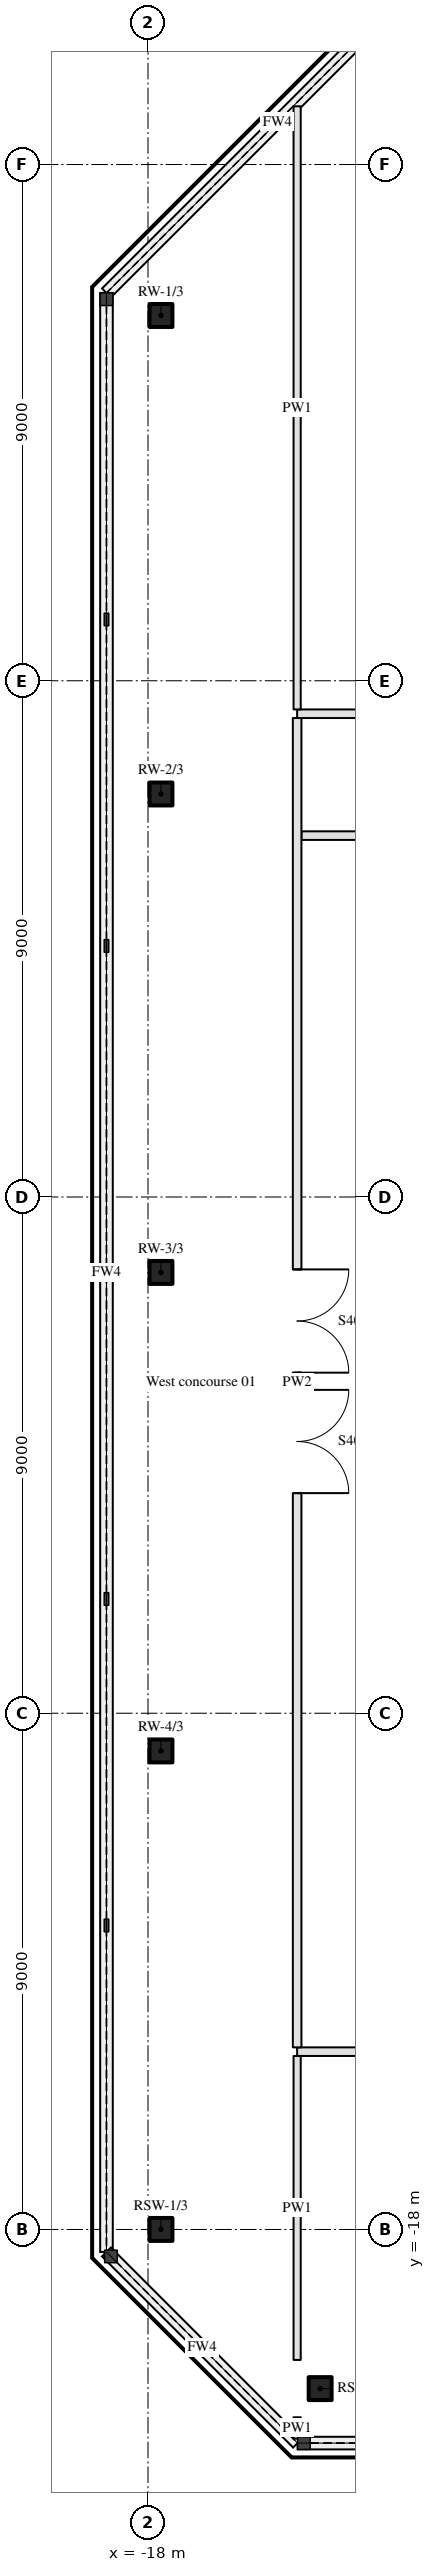
"""IFC4 building model, lengths in metres.
Left out: names, types, materials, properties, quantities, classifications, styles, units other than length and angle.
Written with IfcOpenShell. Run it as: python <this file> out.ifc"""

import sys

from ifc_helpers import new_model, si_unit, direction, frame, frame_2d, origin, origin_2d, place, context, subcontext, project, spatial, rectangle, hollow_rectangle, extrude, element, fill, save


model = new_model("IFC4")
c1 = context("Model", 3, precision=1e-05, world=origin(), true_north=direction((0.0, 1.0)))
c2 = subcontext(c1, "Body", "Model", "MODEL_VIEW")
j1 = project(units=[si_unit("LENGTHUNIT", "METRE"), si_unit("PLANEANGLEUNIT", "RADIAN")], contexts=[c1])
p1 = place(None, origin())
s1 = spatial("IfcSite", under=j1, at=p1, CompositionType="ELEMENT")
p2 = place(p1, origin())
s2 = spatial("IfcBuilding", under=s1, at=p2, CompositionType="ELEMENT")
p3 = place(p2, frame((0.0, 0.0, 162.3)))
s3 = spatial("IfcBuildingStorey", under=s2, at=p3, CompositionType="ELEMENT", Elevation=162.3)
for number, where, z_axis, x_axis in (
    (1, (-14.999, -20.774, 0.0), (0.0, 0.0, 1.0), (1.0, 0.0, 0.0)),
    (2, (-17.774, 15.368, 0.0), (0.0, 0.0, 1.0), (1.0, 0.0, 0.0)),
    (3, (-17.774, 7.026, 0.0), (0.0, 0.0, 1.0), (1.0, 0.0, 0.0)),
    (4, (-17.774, -1.315, 0.0), (0.0, 0.0, 1.0), (1.0, 0.0, 0.0)),
    (5, (-17.774, -9.657, 0.0), (0.0, 0.0, 1.0), (1.0, 0.0, 0.0)),
    (6, (-17.774, -17.999, 0.0), (0.0, 0.0, 1.0), (1.0, 0.0, 0.0)),
):
    element("IfcColumn", number, at=place(p3, frame(where, z_axis=z_axis, x_axis=x_axis)), inside=s3, PredefinedType="COLUMN", context=c2, shape_type="SweptSolid", body=[
        extrude(hollow_rectangle(XDim=0.4, YDim=0.4, WallThickness=0.02, InnerFilletRadius=0.03, OuterFilletRadius=0.05, at=origin_2d()), origin(), (0.0, 0.0, 1.0), 5.4),
    ])
p4 = place(p3, frame((-15.4, -14.9, 0.0), z_axis=(0.0, 0.0, 1.0), x_axis=(1.0, 0.0, 0.0)))
e7 = element("IfcWall", 7, at=p4, inside=s3, PredefinedType="PARTITIONING", context=c2, shape_type="SweptSolid", body=[
    extrude(rectangle(XDim=30.8, YDim=0.15, at=frame_2d((15.4, 0.0))), origin(), (0.0, 0.0, 1.0), 4.46),
])
p5 = place(p4, frame((14.5, 0.0, 0.0)))
e8 = element("IfcOpeningElement", 8, at=p5, cuts=e7, PredefinedType="OPENING", context=c2, shape_type="SweptSolid", body=[
    extrude(rectangle(XDim=1.8, YDim=2.1, at=frame_2d((0.9, 1.05))), frame((0.0, 0.085, 0.0), z_axis=(0.0, -1.0, 0.0), x_axis=(1.0, 0.0, 0.0)), (0.0, 0.0, 1.0), 0.17),
])
p6 = place(p4, frame((16.6, 0.0, 0.0)))
e9 = element("IfcOpeningElement", 9, at=p6, cuts=e7, PredefinedType="OPENING", context=c2, shape_type="SweptSolid", body=[
    extrude(rectangle(XDim=1.8, YDim=2.1, at=frame_2d((0.9, 1.05))), frame((0.0, 0.085, 0.0), z_axis=(0.0, -1.0, 0.0), x_axis=(1.0, 0.0, 0.0)), (0.0, 0.0, 1.0), 0.17),
])
p7 = place(p3, frame((-15.325, 6.3, 0.0), z_axis=(0.0, 0.0, 1.0), x_axis=(1.0, 0.0, 0.0)))
e10 = element("IfcWall", 10, at=p7, inside=s3, PredefinedType="PARTITIONING", context=c2, shape_type="SweptSolid", body=[
    extrude(rectangle(XDim=7.975, YDim=0.15, at=frame_2d((3.987, 0.0))), origin(), (0.0, 0.0, 1.0), 4.46),
])
p8 = place(p7, frame((1.55, 0.0, 0.0)))
e11 = element("IfcOpeningElement", 11, at=p8, cuts=e10, PredefinedType="OPENING", context=c2, shape_type="SweptSolid", body=[
    extrude(rectangle(XDim=0.9, YDim=2.1, at=frame_2d((0.45, 1.05))), frame((0.0, 0.085, 0.0), z_axis=(0.0, -1.0, 0.0), x_axis=(1.0, 0.0, 0.0)), (0.0, 0.0, 1.0), 0.17),
])
p9 = place(p7, frame((5.538, 0.0, 0.0)))
e12 = element("IfcOpeningElement", 12, at=p9, cuts=e10, PredefinedType="OPENING", context=c2, shape_type="SweptSolid", body=[
    extrude(rectangle(XDim=0.9, YDim=2.1, at=frame_2d((0.45, 1.05))), frame((0.0, 0.085, 0.0), z_axis=(0.0, -1.0, 0.0), x_axis=(1.0, 0.0, 0.0)), (0.0, 0.0, 1.0), 0.17),
])
p10 = place(p3, frame((-15.4, 8.425, 0.0), z_axis=(0.0, 0.0, 1.0), x_axis=(1.0, 0.0, 0.0)))
e13 = element("IfcWall", 13, at=p10, inside=s3, PredefinedType="PARTITIONING", context=c2, shape_type="SweptSolid", body=[
    extrude(rectangle(XDim=8.15, YDim=0.15, at=frame_2d((4.075, 0.0))), origin(), (0.0, 0.0, 1.0), 4.46),
])
p11 = place(p3, frame((-15.4, -21.646, 0.0), z_axis=(0.0, 0.0, 1.0), x_axis=(0.0, 1.0, 0.0)))
e14 = element("IfcWall", 14, at=p11, inside=s3, PredefinedType="PARTITIONING", context=c2, shape_type="SweptSolid", body=[
    extrude(rectangle(XDim=0.372, YDim=0.125, at=frame_2d((0.186, 0.0))), origin(), (0.0, 0.0, 1.0), 4.46),
])
p12 = place(p3, frame((-15.4, -20.274, 0.0), z_axis=(0.0, 0.0, 1.0), x_axis=(0.0, 1.0, 0.0)))
e15 = element("IfcWall", 15, at=p12, inside=s3, PredefinedType="PARTITIONING", context=c2, shape_type="SweptSolid", body=[
    extrude(rectangle(XDim=5.299, YDim=0.125, at=frame_2d((2.649, 0.0))), origin(), (0.0, 0.0, 1.0), 4.46),
])
p13 = place(p3, frame((-15.4, 8.35, 0.0), z_axis=(0.0, 0.0, 1.0), x_axis=(0.0, -1.0, 0.0)))
e16 = element("IfcWall", 16, at=p13, inside=s3, PredefinedType="PARTITIONING", context=c2, shape_type="SweptSolid", body=[
    extrude(rectangle(XDim=23.175, YDim=0.15, at=frame_2d((11.587, 0.0))), origin(), (0.0, 0.0, 1.0), 4.46),
])
p14 = place(p13, frame((11.712, 0.0, 0.0)))
e17 = element("IfcOpeningElement", 17, at=p14, cuts=e16, PredefinedType="OPENING", context=c2, shape_type="SweptSolid", body=[
    extrude(rectangle(XDim=1.8, YDim=2.1, at=frame_2d((0.9, 1.05))), frame((0.0, 0.085, 0.0), z_axis=(0.0, -1.0, 0.0), x_axis=(1.0, 0.0, 0.0)), (0.0, 0.0, 1.0), 0.17),
])
p15 = place(p13, frame((9.613, 0.0, 0.0)))
e18 = element("IfcOpeningElement", 18, at=p15, cuts=e16, PredefinedType="OPENING", context=c2, shape_type="SweptSolid", body=[
    extrude(rectangle(XDim=1.8, YDim=2.1, at=frame_2d((0.9, 1.05))), frame((0.0, 0.085, 0.0), z_axis=(0.0, -1.0, 0.0), x_axis=(1.0, 0.0, 0.0)), (0.0, 0.0, 1.0), 0.17),
])
p16 = place(p3, frame((-15.4, 8.5, 0.0), z_axis=(0.0, 0.0, 1.0), x_axis=(0.0, 1.0, 0.0)))
e19 = element("IfcWall", 19, at=p16, inside=s3, PredefinedType="PARTITIONING", context=c2, shape_type="SweptSolid", body=[
    extrude(rectangle(XDim=10.515, YDim=0.125, at=frame_2d((5.257, 0.0))), origin(), (0.0, 0.0, 1.0), 4.46),
])
p17 = place(p14, origin())
e20 = element("IfcDoor", 20, at=p17, inside=s3, OperationType="DOUBLE_DOOR_SINGLE_SWING", PredefinedType="DOOR", context=c2, shape_type="SweptSolid", body=[
    extrude(rectangle(XDim=1.8, YDim=2.1, at=frame_2d((0.9, 1.05))), frame((0.0, 0.025, 0.0), z_axis=(0.0, -1.0, 0.0), x_axis=(1.0, 0.0, 0.0)), (0.0, 0.0, 1.0), 0.05),
])
fill(e17, e20)
p18 = place(p15, origin())
e21 = element("IfcDoor", 21, at=p18, inside=s3, OperationType="DOUBLE_DOOR_SINGLE_SWING", PredefinedType="DOOR", context=c2, shape_type="SweptSolid", body=[
    extrude(rectangle(XDim=1.8, YDim=2.1, at=frame_2d((0.9, 1.05))), frame((0.0, 0.025, 0.0), z_axis=(0.0, -1.0, 0.0), x_axis=(1.0, 0.0, 0.0)), (0.0, 0.0, 1.0), 0.05),
])
fill(e18, e21)
save(model, sys.argv[1])
